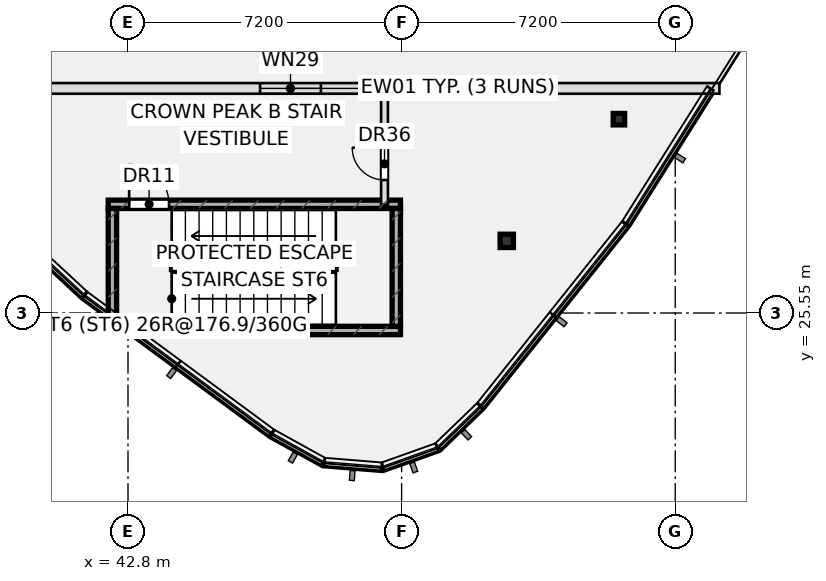
"""IFC4 building model, lengths in metres.
Left out: names, types, materials, properties, quantities, classifications, styles, units other than length and angle.
Written with IfcOpenShell. Run it as: python <this file> out.ifc"""

import sys

from ifc_helpers import new_model, si_unit, direction, frame, frame_2d, origin, origin_2d, place, context, subcontext, project, spatial, rectangle, hollow_rectangle, extrude, element, fill, save


model = new_model("IFC4")
c1 = context("Model", 3, precision=1e-05, world=origin(), true_north=direction((0.0, 1.0)))
c2 = subcontext(c1, "Body", "Model", "MODEL_VIEW")
j1 = project(units=[si_unit("LENGTHUNIT", "METRE"), si_unit("PLANEANGLEUNIT", "RADIAN")], contexts=[c1])
p1 = place(None, origin())
s1 = spatial("IfcSite", under=j1, at=p1, CompositionType="ELEMENT")
p2 = place(p1, origin())
s2 = spatial("IfcBuilding", under=s1, at=p2, CompositionType="ELEMENT")
p3 = place(p2, frame((0.0, 0.0, 332.1)))
s3 = spatial("IfcBuildingStorey", under=s2, at=p3, CompositionType="ELEMENT", Elevation=332.1)
p4 = place(p3, frame((42.28, 25.09, 0.0), z_axis=(0.0, 0.0, 1.0), x_axis=(1.0, 0.0, 0.0)))
e1 = element("IfcWall", 1, at=p4, inside=s3, PredefinedType="SHEAR", context=c2, shape_type="SweptSolid", body=[
    extrude(rectangle(XDim=7.69, YDim=0.22, at=frame_2d((3.845, 0.0))), origin(), (0.0, 0.0, 1.0), 4.25),
])
p5 = place(p3, frame((42.28, 28.41, 0.0), z_axis=(0.0, 0.0, 1.0), x_axis=(1.0, 0.0, 0.0)))
e2 = element("IfcWall", 2, at=p5, inside=s3, PredefinedType="SHEAR", context=c2, shape_type="SweptSolid", body=[
    extrude(rectangle(XDim=7.69, YDim=0.22, at=frame_2d((3.845, 0.0))), origin(), (0.0, 0.0, 1.0), 4.25),
])
p6 = place(p5, frame((0.55, 0.0, 0.0)))
e3 = element("IfcOpeningElement", 3, at=p6, cuts=e2, PredefinedType="OPENING", context=c2, shape_type="SweptSolid", body=[
    extrude(rectangle(XDim=1.05, YDim=2.2, at=frame_2d((0.525, 1.1))), frame((0.0, 0.12, 0.0), z_axis=(0.0, -1.0, 0.0), x_axis=(1.0, 0.0, 0.0)), (0.0, 0.0, 1.0), 0.24),
])
for number, where, z_axis, x_axis in (
    (4, (49.86, 25.2, 0.0), (0.0, 0.0, 1.0), (0.0, 1.0, 0.0)),
    (5, (42.39, 25.2, 0.0), (0.0, 0.0, 1.0), (0.0, 1.0, 0.0)),
):
    element("IfcWall", number, at=place(p3, frame(where, z_axis=z_axis, x_axis=x_axis)), inside=s3, PredefinedType="SHEAR", context=c2, shape_type="SweptSolid", body=[
        extrude(rectangle(XDim=3.1, YDim=0.22, at=frame_2d((1.55, 0.0))), origin(), (0.0, 0.0, 1.0), 4.25),
    ])
p7 = place(p3, frame((52.767, 27.448, 0.0), z_axis=(0.0, 0.0, 1.0), x_axis=(1.0, 0.0, 0.0)))
e6 = element("IfcColumn", 6, at=p7, inside=s3, PredefinedType="COLUMN", context=c2, shape_type="SweptSolid", body=[
    extrude(hollow_rectangle(XDim=0.35, YDim=0.35, WallThickness=0.02, at=origin_2d()), origin(), (0.0, 0.0, 1.0), 4.25),
])
p8 = place(p3, frame((55.719, 30.65, 0.0), z_axis=(0.0, 0.0, 1.0), x_axis=(1.0, 0.0, 0.0)))
e7 = element("IfcColumn", 7, at=p8, inside=s3, PredefinedType="COLUMN", context=c2, shape_type="SweptSolid", body=[
    extrude(hollow_rectangle(XDim=0.3, YDim=0.3, WallThickness=0.016, at=origin_2d()), origin(), (0.0, 0.0, 1.0), 4.25),
])
p9 = place(p3, frame((49.55, 28.4, 0.0), z_axis=(0.0, 0.0, 1.0), x_axis=(0.0, 1.0, 0.0)))
e8 = element("IfcWall", 8, at=p9, inside=s3, PredefinedType="PARTITIONING", context=c2, shape_type="SweptSolid", body=[
    extrude(rectangle(XDim=3.1, YDim=0.18, at=frame_2d((1.55, 0.0))), origin(), (0.0, 0.0, 1.0), 4.25),
])
p10 = place(p9, frame((0.65, 0.0, 0.0)))
e9 = element("IfcOpeningElement", 9, at=p10, cuts=e8, PredefinedType="OPENING", context=c2, shape_type="SweptSolid", body=[
    extrude(rectangle(XDim=0.85, YDim=2.05, at=frame_2d((0.425, 1.025))), frame((0.0, 0.1, 0.0), z_axis=(0.0, -1.0, 0.0), x_axis=(1.0, 0.0, 0.0)), (0.0, 0.0, 1.0), 0.2),
])
p11 = place(p3, frame((58.363, 31.46, 0.0), z_axis=(0.0, 0.0, 1.0), x_axis=(-1.0, 0.0, 0.0)))
e10 = element("IfcWall", 10, at=p11, inside=s3, PredefinedType="STANDARD", context=c2, shape_type="SweptSolid", body=[
    extrude(rectangle(XDim=22.573, YDim=0.28, at=frame_2d((11.287, 0.0))), origin(), (0.0, 0.0, 1.0), 4.25),
])
p12 = place(p11, frame((10.487, 0.0, 0.95)))
e11 = element("IfcOpeningElement", 11, at=p12, cuts=e10, PredefinedType="OPENING", context=c2, shape_type="SweptSolid", body=[
    extrude(rectangle(XDim=1.6, YDim=2.1, at=frame_2d((0.8, 1.05))), frame((0.0, 0.15, 0.0), z_axis=(0.0, -1.0, 0.0), x_axis=(1.0, 0.0, 0.0)), (0.0, 0.0, 1.0), 0.3),
])
p13 = place(p6, origin())
e12 = element("IfcDoor", 12, at=p13, inside=s3, OperationType="SINGLE_SWING_LEFT", PredefinedType="DOOR", context=c2, shape_type="SweptSolid", body=[
    extrude(rectangle(XDim=1.05, YDim=2.2, at=frame_2d((0.525, 1.1))), frame((0.0, 0.025, 0.0), z_axis=(0.0, -1.0, 0.0), x_axis=(1.0, 0.0, 0.0)), (0.0, 0.0, 1.0), 0.05),
])
fill(e3, e12)
p14 = place(p10, origin())
e13 = element("IfcDoor", 13, at=p14, inside=s3, OperationType="SINGLE_SWING_RIGHT", PredefinedType="DOOR", context=c2, shape_type="SweptSolid", body=[
    extrude(rectangle(XDim=0.85, YDim=2.05, at=frame_2d((0.425, 1.025))), frame((0.0, 0.025, 0.0), z_axis=(0.0, -1.0, 0.0), x_axis=(1.0, 0.0, 0.0)), (0.0, 0.0, 1.0), 0.05),
])
fill(e9, e13)
p15 = place(p12, origin())
e14 = element("IfcWindow", 14, at=p15, inside=s3, PartitioningType="SINGLE_PANEL", PredefinedType="WINDOW", context=c2, shape_type="SweptSolid", body=[
    extrude(rectangle(XDim=1.6, YDim=2.1, at=frame_2d((0.8, 1.05))), frame((0.0, 0.03, 0.0), z_axis=(0.0, -1.0, 0.0), x_axis=(1.0, 0.0, 0.0)), (0.0, 0.0, 1.0), 0.06),
])
fill(e11, e14)
save(model, sys.argv[1])
